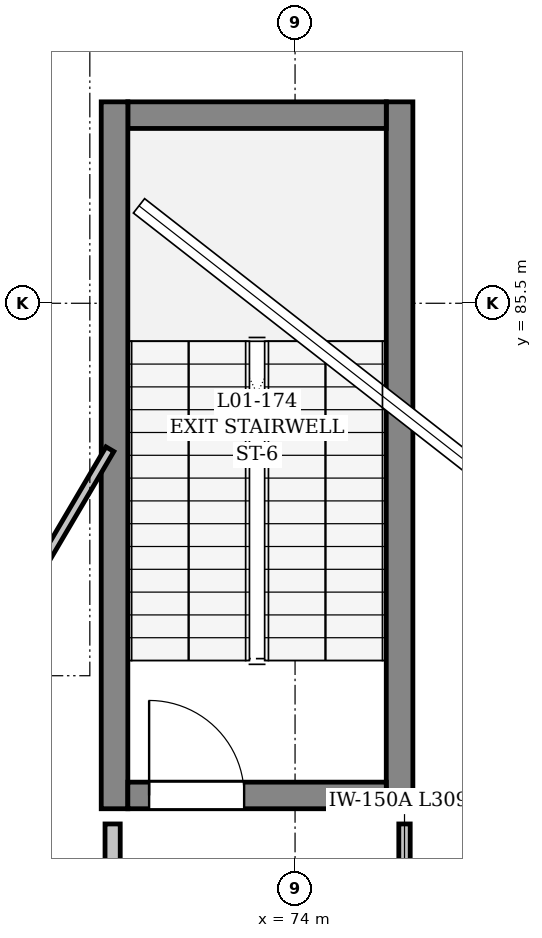
"""IFC4 building model, lengths in metres.
Left out: names, types, materials, properties, quantities, classifications, styles, units other than length and angle.
Written with IfcOpenShell. Run it as: python <this file> out.ifc"""

import sys

from ifc_helpers import new_model, si_unit, direction, frame, frame_2d, origin, place, context, subcontext, project, spatial, rectangle, extrude, element, fill, save


model = new_model("IFC4")
c1 = context("Model", 3, precision=1e-05, world=origin(), true_north=direction((0.0, 1.0)))
c2 = subcontext(c1, "Body", "Model", "MODEL_VIEW")
j1 = project(units=[si_unit("LENGTHUNIT", "METRE"), si_unit("PLANEANGLEUNIT", "RADIAN")], contexts=[c1])
p1 = place(None, origin())
s1 = spatial("IfcSite", under=j1, at=p1, CompositionType="ELEMENT")
p2 = place(p1, origin())
s2 = spatial("IfcBuilding", under=s1, at=p2, CompositionType="ELEMENT")
p3 = place(p2, origin())
s3 = spatial("IfcBuildingStorey", under=s2, at=p3, CompositionType="ELEMENT", Elevation=0.0)
p4 = place(p3, frame((75.375, 78.85, 0.0), z_axis=(0.0, 0.0, 1.0), x_axis=(0.0, 1.0, 0.0)))
e1 = element("IfcWall", 1, at=p4, inside=s3, PredefinedType="SHEAR", context=c2, shape_type="SweptSolid", body=[
    extrude(rectangle(XDim=9.3, YDim=0.35, at=frame_2d((4.65, 0.0))), origin(), (0.0, 0.0, 1.0), 5.1),
])
p5 = place(p3, frame((75.2, 87.975, 0.0), z_axis=(0.0, 0.0, 1.0), x_axis=(-1.0, 0.0, 0.0)))
e2 = element("IfcWall", 2, at=p5, inside=s3, PredefinedType="SHEAR", context=c2, shape_type="SweptSolid", body=[
    extrude(rectangle(XDim=3.4, YDim=0.35, at=frame_2d((1.7, 0.0))), origin(), (0.0, 0.0, 1.0), 5.1),
])
p6 = place(p3, frame((71.625, 88.15, 0.0), z_axis=(0.0, 0.0, 1.0), x_axis=(0.0, -1.0, 0.0)))
e3 = element("IfcWall", 3, at=p6, inside=s3, PredefinedType="SHEAR", context=c2, shape_type="SweptSolid", body=[
    extrude(rectangle(XDim=9.3, YDim=0.35, at=frame_2d((4.65, 0.0))), origin(), (0.0, 0.0, 1.0), 5.1),
])
p7 = place(p3, frame((71.8, 79.025, 0.0), z_axis=(0.0, 0.0, 1.0), x_axis=(1.0, 0.0, 0.0)))
e4 = element("IfcWall", 4, at=p7, inside=s3, PredefinedType="SHEAR", context=c2, shape_type="SweptSolid", body=[
    extrude(rectangle(XDim=3.4, YDim=0.35, at=frame_2d((1.7, 0.0))), origin(), (0.0, 0.0, 1.0), 5.1),
])
p8 = place(p7, frame((0.28, 0.0, 0.0)))
e5 = element("IfcOpeningElement", 5, at=p8, cuts=e4, PredefinedType="OPENING", context=c2, shape_type="SweptSolid", body=[
    extrude(rectangle(XDim=1.25, YDim=2.2, at=frame_2d((0.625, 1.1))), frame((0.0, 0.185, 0.0), z_axis=(0.0, -1.0, 0.0), x_axis=(1.0, 0.0, 0.0)), (0.0, 0.0, 1.0), 0.37),
])
p9 = place(p3, frame((71.6, 78.65, 0.0), z_axis=(0.0, 0.0, 1.0), x_axis=(0.0, -1.0, 0.0)))
e6 = element("IfcWall", 6, at=p9, inside=s3, PredefinedType="PARTITIONING", context=c2, shape_type="SweptSolid", body=[
    extrude(rectangle(XDim=3.05, YDim=0.2, at=frame_2d((1.525, 0.0))), origin(), (0.0, 0.0, 1.0), 5.1),
])
p10 = place(p9, frame((0.9, 0.0, 0.0)))
e7 = element("IfcOpeningElement", 7, at=p10, cuts=e6, PredefinedType="OPENING", context=c2, shape_type="SweptSolid", body=[
    extrude(rectangle(XDim=1.25, YDim=2.2, at=frame_2d((0.625, 1.1))), frame((0.0, 0.11, 0.0), z_axis=(0.0, -1.0, 0.0), x_axis=(1.0, 0.0, 0.0)), (0.0, 0.0, 1.0), 0.22),
])
p11 = place(p3, frame((67.34, 76.41, 0.0), z_axis=(0.0, 0.0, 1.0), x_axis=(0.507554651223, 0.861619565714, 0.0)))
e8 = element("IfcWall", 8, at=p11, inside=s3, PredefinedType="PARTITIONING", context=c2, shape_type="SweptSolid", body=[
    extrude(rectangle(XDim=8.322, YDim=0.12, at=frame_2d((4.161, 0.0))), origin(), (0.0, 0.0, 1.0), 4.39),
])
p12 = place(p3, frame((75.44, 78.65, 0.0), z_axis=(0.0, 0.0, 1.0), x_axis=(0.0, -1.0, 0.0)))
e9 = element("IfcWall", 9, at=p12, inside=s3, PredefinedType="PARTITIONING", context=c2, shape_type="SweptSolid", body=[
    extrude(rectangle(XDim=3.09, YDim=0.15, at=frame_2d((1.545, 0.0))), origin(), (0.0, 0.0, 1.0), 3.99),
])
p13 = place(p12, frame((0.645, 0.0, 0.0)))
e10 = element("IfcOpeningElement", 10, at=p13, cuts=e9, PredefinedType="OPENING", context=c2, shape_type="SweptSolid", body=[
    extrude(rectangle(XDim=1.8, YDim=2.4, at=frame_2d((0.9, 1.2))), frame((0.0, 0.085, 0.0), z_axis=(0.0, -1.0, 0.0), x_axis=(1.0, 0.0, 0.0)), (0.0, 0.0, 1.0), 0.17),
])
p14 = place(p8, origin())
e11 = element("IfcDoor", 11, at=p14, inside=s3, OperationType="SINGLE_SWING_RIGHT", PredefinedType="DOOR", context=c2, shape_type="SweptSolid", body=[
    extrude(rectangle(XDim=1.25, YDim=2.2, at=frame_2d((0.625, 1.1))), frame((0.0, 0.025, 0.0), z_axis=(0.0, -1.0, 0.0), x_axis=(1.0, 0.0, 0.0)), (0.0, 0.0, 1.0), 0.05),
])
fill(e5, e11)
save(model, sys.argv[1])
